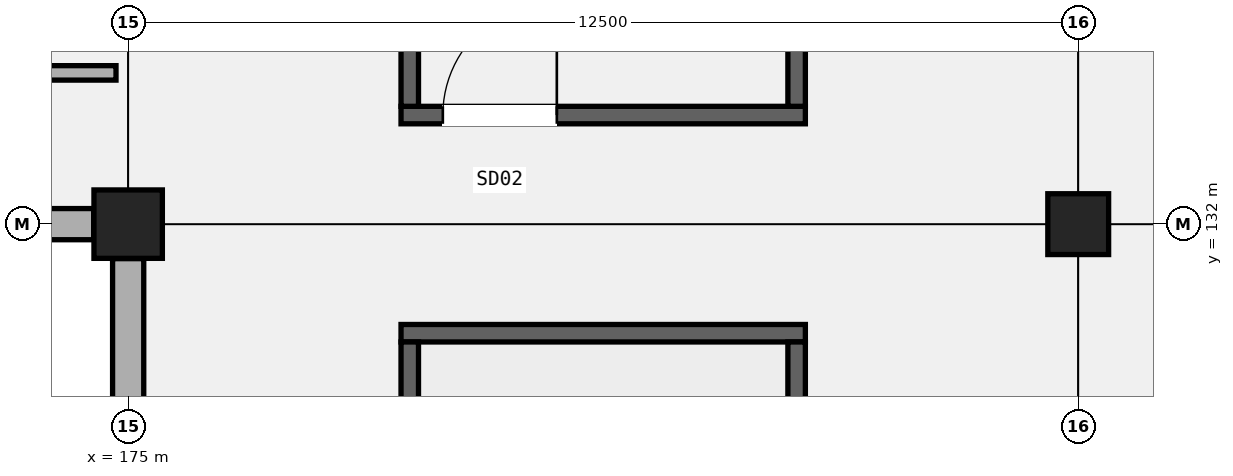
"""IFC4 building model, lengths in metres.
Left out: names, types, materials, properties, quantities, classifications, styles, units other than length and angle.
Written with IfcOpenShell. Run it as: python <this file> out.ifc"""

import sys

from ifc_helpers import new_model, si_unit, direction, frame, frame_2d, origin, origin_2d, place, context, subcontext, project, spatial, rectangle, extrude, element, fill, save


model = new_model("IFC4")
c1 = context("Model", 3, precision=1e-05, world=origin(), true_north=direction((0.0, 1.0)))
c2 = subcontext(c1, "Body", "Model", "MODEL_VIEW")
j1 = project(units=[si_unit("LENGTHUNIT", "METRE"), si_unit("PLANEANGLEUNIT", "RADIAN")], contexts=[c1])
p1 = place(None, origin())
s1 = spatial("IfcSite", under=j1, at=p1, CompositionType="ELEMENT")
p2 = place(p1, origin())
s2 = spatial("IfcBuilding", under=s1, at=p2, CompositionType="ELEMENT")
p3 = place(p2, frame((0.0, 0.0, 5.4)))
s3 = spatial("IfcBuildingStorey", under=s2, at=p3, CompositionType="ELEMENT", Elevation=5.4)
p4 = place(p3, frame((175.0, 132.0, 0.0), z_axis=(0.0, 0.0, 1.0), x_axis=(1.0, 0.0, 0.0)))
e1 = element("IfcColumn", 1, at=p4, inside=s3, PredefinedType="COLUMN", context=c2, shape_type="SweptSolid", body=[
    extrude(rectangle(XDim=0.9, YDim=0.9, at=origin_2d()), origin(), (0.0, 0.0, 1.0), 4.8),
])
p5 = place(p3, frame((187.5, 132.0, 0.0), z_axis=(0.0, 0.0, 1.0), x_axis=(1.0, 0.0, 0.0)))
e2 = element("IfcColumn", 2, at=p5, inside=s3, PredefinedType="COLUMN", context=c2, shape_type="SweptSolid", body=[
    extrude(rectangle(XDim=0.8, YDim=0.8, at=origin_2d()), origin(), (0.0, 0.0, 1.0), 4.8),
])
p6 = place(p3, frame((173.896, 132.0, 0.0), z_axis=(0.0, 0.0, 1.0), x_axis=(1.0, 0.0, 0.0)))
e3 = element("IfcWall", 3, at=p6, inside=s3, PredefinedType="SOLIDWALL", context=c2, shape_type="SweptSolid", body=[
    extrude(rectangle(XDim=0.65, YDim=0.41, at=frame_2d((0.325, 0.0))), origin(), (0.0, 0.0, 1.0), 4.15),
])
p7 = place(p3, frame((175.0, 120.504, 0.0), z_axis=(0.0, 0.0, 1.0), x_axis=(0.0, 1.0, 0.0)))
e4 = element("IfcWall", 4, at=p7, inside=s3, PredefinedType="SOLIDWALL", context=c2, shape_type="SweptSolid", body=[
    extrude(rectangle(XDim=11.042, YDim=0.41, at=frame_2d((5.521, 0.0))), origin(), (0.0, 0.0, 1.0), 4.15),
])
p8 = place(p7, frame((1.5, 0.0, 0.95)))
e5 = element("IfcOpeningElement", 5, at=p8, cuts=e4, PredefinedType="OPENING", context=c2, shape_type="SweptSolid", body=[
    extrude(rectangle(XDim=2.4, YDim=1.65, at=frame_2d((1.2, 0.825))), frame((0.0, 0.215, 0.0), z_axis=(0.0, -1.0, 0.0), x_axis=(1.0, 0.0, 0.0)), (0.0, 0.0, 1.0), 0.43),
])
p9 = place(p3, frame((178.59, 133.435, 0.0), z_axis=(0.0, 0.0, 1.0), x_axis=(1.0, 0.0, 0.0)))
e6 = element("IfcWall", 6, at=p9, inside=s3, PredefinedType="SHEAR", context=c2, shape_type="SweptSolid", body=[
    extrude(rectangle(XDim=5.32, YDim=0.23, at=frame_2d((2.66, 0.0))), origin(), (0.0, 0.0, 1.0), 4.55),
])
p10 = place(p9, frame((0.55, 0.0, 0.0)))
e7 = element("IfcOpeningElement", 7, at=p10, cuts=e6, PredefinedType="OPENING", context=c2, shape_type="SweptSolid", body=[
    extrude(rectangle(XDim=1.5, YDim=2.2, at=frame_2d((0.75, 1.1))), frame((0.0, 0.125, 0.0), z_axis=(0.0, -1.0, 0.0), x_axis=(1.0, 0.0, 0.0)), (0.0, 0.0, 1.0), 0.25),
])
for number, where, z_axis, x_axis in (
    (8, (178.705, 133.55, 0.0), (0.0, 0.0, 1.0), (0.0, 1.0, 0.0)),
    (9, (183.795, 133.55, 0.0), (0.0, 0.0, 1.0), (0.0, 1.0, 0.0)),
):
    element("IfcWall", number, at=place(p3, frame(where, z_axis=z_axis, x_axis=x_axis)), inside=s3, PredefinedType="SHEAR", context=c2, shape_type="SweptSolid", body=[
        extrude(rectangle(XDim=8.9, YDim=0.23, at=frame_2d((4.45, 0.0))), origin(), (0.0, 0.0, 1.0), 4.55),
    ])
p11 = place(p3, frame((178.59, 130.565, 0.0), z_axis=(0.0, 0.0, 1.0), x_axis=(1.0, 0.0, 0.0)))
e10 = element("IfcWall", 10, at=p11, inside=s3, PredefinedType="SHEAR", context=c2, shape_type="SweptSolid", body=[
    extrude(rectangle(XDim=5.32, YDim=0.23, at=frame_2d((2.66, 0.0))), origin(), (0.0, 0.0, 1.0), 4.55),
])
for number, where, z_axis, x_axis in (
    (11, (178.705, 121.55, 0.0), (0.0, 0.0, 1.0), (0.0, 1.0, 0.0)),
    (12, (183.795, 121.55, 0.0), (0.0, 0.0, 1.0), (0.0, 1.0, 0.0)),
):
    element("IfcWall", number, at=place(p3, frame(where, z_axis=z_axis, x_axis=x_axis)), inside=s3, PredefinedType="SHEAR", context=c2, shape_type="SweptSolid", body=[
        extrude(rectangle(XDim=8.9, YDim=0.23, at=frame_2d((4.45, 0.0))), origin(), (0.0, 0.0, 1.0), 4.55),
    ])
p12 = place(p3, frame((162.66, 133.99, 0.0), z_axis=(0.0, 0.0, 1.0), x_axis=(1.0, 0.0, 0.0)))
e13 = element("IfcWall", 13, at=p12, inside=s3, PredefinedType="PARTITIONING", context=c2, shape_type="SweptSolid", body=[
    extrude(rectangle(XDim=12.18, YDim=0.19, at=frame_2d((6.09, 0.0))), origin(), (0.0, 0.0, 1.0), 3.92),
])
p13 = place(p12, frame((5.39, 0.0, 0.0)))
e14 = element("IfcOpeningElement", 14, at=p13, cuts=e13, PredefinedType="OPENING", context=c2, shape_type="SweptSolid", body=[
    extrude(rectangle(XDim=1.4, YDim=2.24, at=frame_2d((0.7, 1.12))), frame((0.0, 0.105, 0.0), z_axis=(0.0, -1.0, 0.0), x_axis=(1.0, 0.0, 0.0)), (0.0, 0.0, 1.0), 0.21),
])
p14 = place(p10, origin())
e15 = element("IfcDoor", 15, at=p14, inside=s3, OperationType="SINGLE_SWING_RIGHT", PredefinedType="DOOR", context=c2, shape_type="SweptSolid", body=[
    extrude(rectangle(XDim=1.5, YDim=2.2, at=frame_2d((0.75, 1.1))), frame((0.0, 0.025, 0.0), z_axis=(0.0, -1.0, 0.0), x_axis=(1.0, 0.0, 0.0)), (0.0, 0.0, 1.0), 0.05),
])
fill(e7, e15)
save(model, sys.argv[1])
